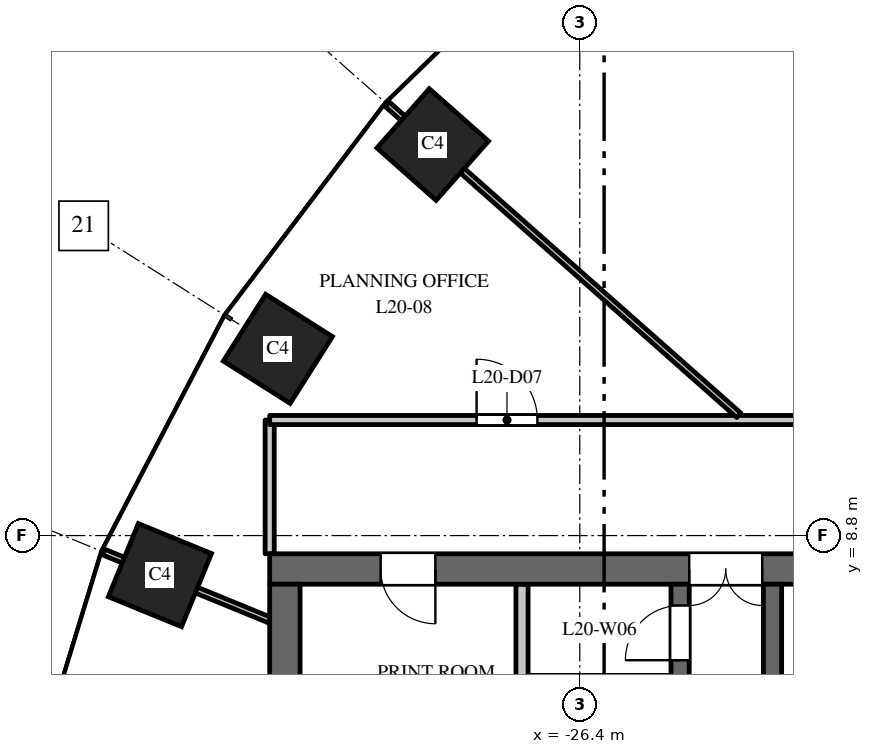
"""IFC4 building model, lengths in metres.
Left out: names, types, materials, properties, quantities, classifications, styles, units other than length and angle.
Written with IfcOpenShell. Run it as: python <this file> out.ifc"""

import sys

from ifc_helpers import new_model, si_unit, direction, frame, frame_2d, origin, origin_2d, place, context, subcontext, project, spatial, rectangle, extrude, element, fill, save


model = new_model("IFC4")
c1 = context("Model", 3, precision=1e-05, world=origin(), true_north=direction((0.0, 1.0)))
c2 = subcontext(c1, "Body", "Model", "MODEL_VIEW")
j1 = project(units=[si_unit("LENGTHUNIT", "METRE"), si_unit("PLANEANGLEUNIT", "RADIAN")], contexts=[c1])
p1 = place(None, origin())
s1 = spatial("IfcSite", under=j1, at=p1, CompositionType="ELEMENT")
p2 = place(p1, origin())
s2 = spatial("IfcBuilding", under=s1, at=p2, CompositionType="ELEMENT")
p3 = place(p2, frame((0.0, 0.0, 92.0)))
s3 = spatial("IfcBuildingStorey", under=s2, at=p3, CompositionType="ELEMENT", Elevation=92.0)
for number, where, z_axis, x_axis in (
    (1, (-28.819, 15.23, 0.0), (0.0, 0.0, 1.0), (-0.663, -0.749, 0.0)),
    (2, (-31.365, 11.871, 0.0), (0.0, 0.0, 1.0), (-0.535, -0.845, 0.0)),
    (3, (-33.305, 8.149, 0.0), (0.0, 0.0, 1.0), (-0.379, -0.925, 0.0)),
):
    element("IfcColumn", number, at=place(p3, frame(where, z_axis=z_axis, x_axis=x_axis)), inside=s3, PredefinedType="COLUMN", context=c2, shape_type="SweptSolid", body=[
        extrude(rectangle(XDim=1.3, YDim=1.3, at=origin_2d()), origin(), (0.0, 0.0, 1.0), 4.0),
    ])
p4 = place(p3, frame((-16.5, 8.25, 0.0), z_axis=(0.0, 0.0, 1.0), x_axis=(-1.0, 0.0, 0.0)))
e4 = element("IfcWall", 4, at=p4, inside=s3, PredefinedType="SHEAR", context=c2, shape_type="SweptSolid", body=[
    extrude(rectangle(XDim=15.0, YDim=0.5, at=frame_2d((7.5, 0.0))), origin(), (0.0, 0.0, 1.0), 3.7),
])
p5 = place(p4, frame((6.9, 0.0, 0.0)))
e5 = element("IfcOpeningElement", 5, at=p5, cuts=e4, PredefinedType="OPENING", context=c2, shape_type="SweptSolid", body=[
    extrude(rectangle(XDim=1.2, YDim=2.1, at=frame_2d((0.6, 1.05))), frame((0.0, 0.26, 0.0), z_axis=(0.0, -1.0, 0.0), x_axis=(1.0, 0.0, 0.0)), (0.0, 0.0, 1.0), 0.52),
])
p6 = place(p4, frame((12.275, 0.0, 0.0)))
e6 = element("IfcOpeningElement", 6, at=p6, cuts=e4, PredefinedType="OPENING", context=c2, shape_type="SweptSolid", body=[
    extrude(rectangle(XDim=0.9, YDim=2.1, at=frame_2d((0.45, 1.05))), frame((0.0, 0.26, 0.0), z_axis=(0.0, -1.0, 0.0), x_axis=(1.0, 0.0, 0.0)), (0.0, 0.0, 1.0), 0.52),
])
p7 = place(p3, frame((-24.75, -8.0, 0.0), z_axis=(0.0, 0.0, 1.0), x_axis=(0.0, 1.0, 0.0)))
e7 = element("IfcWall", 7, at=p7, inside=s3, PredefinedType="SHEAR", context=c2, shape_type="SweptSolid", body=[
    extrude(rectangle(XDim=16.0, YDim=0.3, at=frame_2d((8.0, 0.0))), origin(), (0.0, 0.0, 1.0), 3.7),
])
p8 = place(p7, frame((4.425, 0.0, 0.0)))
e8 = element("IfcOpeningElement", 8, at=p8, cuts=e7, PredefinedType="OPENING", context=c2, shape_type="SweptSolid", body=[
    extrude(rectangle(XDim=1.1, YDim=2.1, at=frame_2d((0.55, 1.05))), frame((0.0, 0.16, 0.0), z_axis=(0.0, -1.0, 0.0), x_axis=(1.0, 0.0, 0.0)), (0.0, 0.0, 1.0), 0.32),
])
p9 = place(p7, frame((7.45, 0.0, 0.0)))
e9 = element("IfcOpeningElement", 9, at=p9, cuts=e7, PredefinedType="OPENING", context=c2, shape_type="SweptSolid", body=[
    extrude(rectangle(XDim=1.1, YDim=2.1, at=frame_2d((0.55, 1.05))), frame((0.0, 0.16, 0.0), z_axis=(0.0, -1.0, 0.0), x_axis=(1.0, 0.0, 0.0)), (0.0, 0.0, 1.0), 0.32),
])
p10 = place(p7, frame((10.425, 0.0, 0.0)))
e10 = element("IfcOpeningElement", 10, at=p10, cuts=e7, PredefinedType="OPENING", context=c2, shape_type="SweptSolid", body=[
    extrude(rectangle(XDim=1.2, YDim=2.1, at=frame_2d((0.6, 1.05))), frame((0.0, 0.16, 0.0), z_axis=(0.0, -1.0, 0.0), x_axis=(1.0, 0.0, 0.0)), (0.0, 0.0, 1.0), 0.32),
])
p11 = place(p7, frame((13.125, 0.0, 0.0)))
e11 = element("IfcOpeningElement", 11, at=p11, cuts=e7, PredefinedType="OPENING", context=c2, shape_type="SweptSolid", body=[
    extrude(rectangle(XDim=0.9, YDim=2.1, at=frame_2d((0.45, 1.05))), frame((0.0, 0.16, 0.0), z_axis=(0.0, -1.0, 0.0), x_axis=(1.0, 0.0, 0.0)), (0.0, 0.0, 1.0), 0.32),
])
p12 = place(p7, frame((14.75, 0.0, 0.0)))
e12 = element("IfcOpeningElement", 12, at=p12, cuts=e7, PredefinedType="OPENING", context=c2, shape_type="SweptSolid", body=[
    extrude(rectangle(XDim=0.9, YDim=2.1, at=frame_2d((0.45, 1.05))), frame((0.0, 0.16, 0.0), z_axis=(0.0, -1.0, 0.0), x_axis=(1.0, 0.0, 0.0)), (0.0, 0.0, 1.0), 0.32),
])
p13 = place(p7, frame((1.35, 0.0, 0.0)))
e13 = element("IfcOpeningElement", 13, at=p13, cuts=e7, PredefinedType="OPENING", context=c2, shape_type="SweptSolid", body=[
    extrude(rectangle(XDim=0.9, YDim=2.1, at=frame_2d((0.45, 1.05))), frame((0.0, 0.16, 0.0), z_axis=(0.0, -1.0, 0.0), x_axis=(1.0, 0.0, 0.0)), (0.0, 0.0, 1.0), 0.32),
])
p14 = place(p3, frame((-31.25, -8.0, 0.0), z_axis=(0.0, 0.0, 1.0), x_axis=(0.0, 1.0, 0.0)))
e14 = element("IfcWall", 14, at=p14, inside=s3, PredefinedType="SHEAR", context=c2, shape_type="SweptSolid", body=[
    extrude(rectangle(XDim=16.0, YDim=0.5, at=frame_2d((8.0, 0.0))), origin(), (0.0, 0.0, 1.0), 3.7),
])
p15 = place(p3, frame((-27.35, 4.75, 0.0), z_axis=(0.0, 0.0, 1.0), x_axis=(0.0, 1.0, 0.0)))
e15 = element("IfcWall", 15, at=p15, inside=s3, PredefinedType="PARTITIONING", context=c2, shape_type="SweptSolid", body=[
    extrude(rectangle(XDim=3.25, YDim=0.2, at=frame_2d((1.625, 0.0))), origin(), (0.0, 0.0, 1.0), 3.7),
])
p16 = place(p3, frame((-23.23, 2.25, 0.0), z_axis=(0.0, 0.0, 1.0), x_axis=(0.0, 1.0, 0.0)))
e16 = element("IfcWall", 16, at=p16, inside=s3, PredefinedType="SHEAR", context=c2, shape_type="SweptSolid", body=[
    extrude(rectangle(XDim=5.75, YDim=0.3, at=frame_2d((2.875, 0.0))), origin(), (0.0, 0.0, 1.0), 3.7),
])
p17 = place(p16, frame((0.6, 0.0, 0.0)))
e17 = element("IfcOpeningElement", 17, at=p17, cuts=e16, PredefinedType="OPENING", context=c2, shape_type="SweptSolid", body=[
    extrude(rectangle(XDim=1.0, YDim=2.1, at=frame_2d((0.5, 1.05))), frame((0.0, 0.16, 0.0), z_axis=(0.0, -1.0, 0.0), x_axis=(1.0, 0.0, 0.0)), (0.0, 0.0, 1.0), 0.32),
])
p18 = place(p3, frame((-34.234, 8.53, 0.0), z_axis=(0.0, 0.0, 1.0), x_axis=(0.925344112436, -0.379128307542, 0.0)))
e18 = element("IfcWall", 18, at=p18, inside=s3, PredefinedType="PARTITIONING", context=c2, shape_type="SweptSolid", body=[
    extrude(rectangle(XDim=2.954, YDim=0.1, at=frame_2d((1.477, 0.0))), origin(), (0.0, 0.0, 1.0), 2.9),
])
p19 = place(p3, frame((-31.5, 8.5, 0.0), z_axis=(0.0, 0.0, 1.0), x_axis=(0.0, 1.0, 0.0)))
e19 = element("IfcWall", 19, at=p19, inside=s3, PredefinedType="PARTITIONING", context=c2, shape_type="SweptSolid", body=[
    extrude(rectangle(XDim=2.2, YDim=0.15, at=frame_2d((1.1, 0.0))), origin(), (0.0, 0.0, 1.0), 3.7),
])
p20 = place(p3, frame((-31.5, 10.7, 0.0), z_axis=(0.0, 0.0, 1.0), x_axis=(1.0, 0.0, 0.0)))
e20 = element("IfcWall", 20, at=p20, inside=s3, PredefinedType="PARTITIONING", context=c2, shape_type="SweptSolid", body=[
    extrude(rectangle(XDim=15.0, YDim=0.15, at=frame_2d((7.5, 0.0))), origin(), (0.0, 0.0, 1.0), 3.1),
])
p21 = place(p20, frame((3.403, 0.0, 0.0)))
e21 = element("IfcOpeningElement", 21, at=p21, cuts=e20, PredefinedType="OPENING", context=c2, shape_type="SweptSolid", body=[
    extrude(rectangle(XDim=1.0, YDim=2.1, at=frame_2d((0.5, 1.05))), frame((0.0, 0.085, 0.0), z_axis=(0.0, -1.0, 0.0), x_axis=(1.0, 0.0, 0.0)), (0.0, 0.0, 1.0), 0.17),
])
p22 = place(p20, frame((10.85, 0.0, 0.0)))
e22 = element("IfcOpeningElement", 22, at=p22, cuts=e20, PredefinedType="OPENING", context=c2, shape_type="SweptSolid", body=[
    extrude(rectangle(XDim=1.0, YDim=2.1, at=frame_2d((0.5, 1.05))), frame((0.0, 0.085, 0.0), z_axis=(0.0, -1.0, 0.0), x_axis=(1.0, 0.0, 0.0)), (0.0, 0.0, 1.0), 0.17),
])
p23 = place(p3, frame((-29.569, 15.895, 0.0), z_axis=(0.0, 0.0, 1.0), x_axis=(0.748985701008, -0.662586160198, 0.0)))
e23 = element("IfcWall", 23, at=p23, inside=s3, PredefinedType="PARTITIONING", context=c2, shape_type="SweptSolid", body=[
    extrude(rectangle(XDim=7.723, YDim=0.1, at=frame_2d((3.861, 0.0))), origin(), (0.0, 0.0, 1.0), 2.9),
])
p24 = place(p5, origin())
e24 = element("IfcDoor", 24, at=p24, inside=s3, OperationType="DOUBLE_DOOR_DOUBLE_SWING", PredefinedType="DOOR", context=c2, shape_type="SweptSolid", body=[
    extrude(rectangle(XDim=1.2, YDim=2.1, at=frame_2d((0.6, 1.05))), frame((0.0, 0.025, 0.0), z_axis=(0.0, -1.0, 0.0), x_axis=(1.0, 0.0, 0.0)), (0.0, 0.0, 1.0), 0.05),
])
fill(e5, e24)
p25 = place(p12, origin())
e25 = element("IfcDoor", 25, at=p25, inside=s3, OperationType="SINGLE_SWING_RIGHT", PredefinedType="DOOR", context=c2, shape_type="SweptSolid", body=[
    extrude(rectangle(XDim=0.9, YDim=2.1, at=frame_2d((0.45, 1.05))), frame((0.0, 0.025, 0.0), z_axis=(0.0, -1.0, 0.0), x_axis=(1.0, 0.0, 0.0)), (0.0, 0.0, 1.0), 0.05),
])
fill(e12, e25)
p26 = place(p6, origin())
e26 = element("IfcDoor", 26, at=p26, inside=s3, OperationType="SINGLE_SWING_RIGHT", PredefinedType="DOOR", context=c2, shape_type="SweptSolid", body=[
    extrude(rectangle(XDim=0.9, YDim=2.1, at=frame_2d((0.45, 1.05))), frame((0.0, 0.025, 0.0), z_axis=(0.0, -1.0, 0.0), x_axis=(1.0, 0.0, 0.0)), (0.0, 0.0, 1.0), 0.05),
])
fill(e6, e26)
p27 = place(p21, origin())
e27 = element("IfcDoor", 27, at=p27, inside=s3, OperationType="SINGLE_SWING_LEFT", PredefinedType="DOOR", context=c2, shape_type="SweptSolid", body=[
    extrude(rectangle(XDim=1.0, YDim=2.1, at=frame_2d((0.5, 1.05))), frame((0.0, 0.025, 0.0), z_axis=(0.0, -1.0, 0.0), x_axis=(1.0, 0.0, 0.0)), (0.0, 0.0, 1.0), 0.05),
])
fill(e21, e27)
save(model, sys.argv[1])
